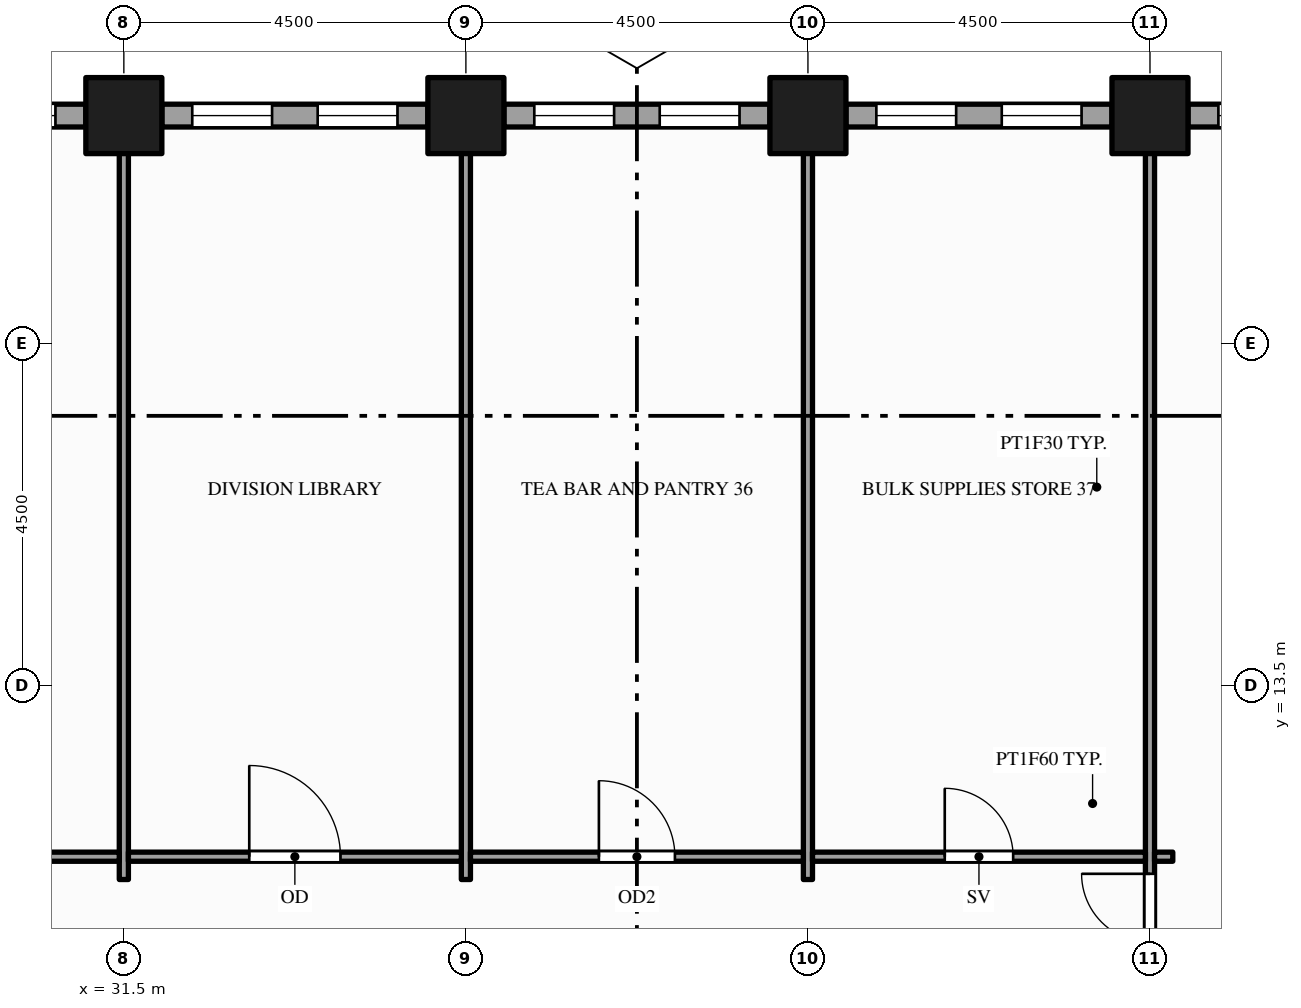
"""IFC4 building model, lengths in metres.
Left out: names, types, materials, properties, quantities, classifications, styles, units other than length and angle.
Written with IfcOpenShell. Run it as: python <this file> out.ifc"""

import sys

from ifc_helpers import new_model, si_unit, direction, frame, frame_2d, origin, origin_2d, place, context, subcontext, project, spatial, rectangle, hollow_rectangle, extrude, element, fill, save


model = new_model("IFC4")
c1 = context("Model", 3, precision=1e-05, world=origin(), true_north=direction((0.0, 1.0)))
c2 = subcontext(c1, "Body", "Model", "MODEL_VIEW")
j1 = project(units=[si_unit("LENGTHUNIT", "METRE"), si_unit("PLANEANGLEUNIT", "RADIAN")], contexts=[c1])
p1 = place(None, origin())
s1 = spatial("IfcSite", under=j1, at=p1, CompositionType="ELEMENT")
p2 = place(p1, origin())
s2 = spatial("IfcBuilding", under=s1, at=p2, CompositionType="ELEMENT")
p3 = place(p2, frame((0.0, 0.0, 115.0)))
s3 = spatial("IfcBuildingStorey", under=s2, at=p3, CompositionType="ELEMENT", Elevation=115.0)
for number, where, z_axis, x_axis in (
    (1, (31.5, 21.0, -0.15), (0.0, 0.0, 1.0), (1.0, 0.0, 0.0)),
    (2, (36.0, 21.0, -0.15), (0.0, 0.0, 1.0), (1.0, 0.0, 0.0)),
    (3, (40.5, 21.0, -0.15), (0.0, 0.0, 1.0), (1.0, 0.0, 0.0)),
    (4, (45.0, 21.0, -0.15), (0.0, 0.0, 1.0), (1.0, 0.0, 0.0)),
):
    element("IfcColumn", number, at=place(p3, frame(where, z_axis=z_axis, x_axis=x_axis)), inside=s3, PredefinedType="COLUMN", context=c2, shape_type="SweptSolid", body=[
        extrude(hollow_rectangle(XDim=1.0, YDim=1.0, WallThickness=0.05, at=origin_2d()), origin(), (0.0, 0.0, 1.0), 4.0),
    ])
p4 = place(p3, frame((49.0, 21.0, 0.0), z_axis=(0.0, 0.0, 1.0), x_axis=(-1.0, 0.0, 0.0)))
e5 = element("IfcWall", 5, at=p4, inside=s3, PredefinedType="STANDARD", context=c2, shape_type="SweptSolid", body=[
    extrude(rectangle(XDim=3.5, YDim=0.3, at=frame_2d((1.75, 0.0))), origin(), (0.0, 0.0, 1.0), 3.154),
])
p5 = place(p4, frame((0.4, 0.0, 0.9)))
e6 = element("IfcOpeningElement", 6, at=p5, cuts=e5, PredefinedType="OPENING", context=c2, shape_type="SweptSolid", body=[
    extrude(rectangle(XDim=1.05, YDim=2.0, at=frame_2d((0.525, 1.0))), frame((0.0, 0.16, 0.0), z_axis=(0.0, -1.0, 0.0), x_axis=(1.0, 0.0, 0.0)), (0.0, 0.0, 1.0), 0.32),
])
p6 = place(p4, frame((2.05, 0.0, 0.9)))
e7 = element("IfcOpeningElement", 7, at=p6, cuts=e5, PredefinedType="OPENING", context=c2, shape_type="SweptSolid", body=[
    extrude(rectangle(XDim=1.05, YDim=2.0, at=frame_2d((0.525, 1.0))), frame((0.0, 0.16, 0.0), z_axis=(0.0, -1.0, 0.0), x_axis=(1.0, 0.0, 0.0)), (0.0, 0.0, 1.0), 0.32),
])
p7 = place(p3, frame((44.5, 21.0, 0.0), z_axis=(0.0, 0.0, 1.0), x_axis=(-1.0, 0.0, 0.0)))
e8 = element("IfcWall", 8, at=p7, inside=s3, PredefinedType="STANDARD", context=c2, shape_type="SweptSolid", body=[
    extrude(rectangle(XDim=3.5, YDim=0.3, at=frame_2d((1.75, 0.0))), origin(), (0.0, 0.0, 1.0), 3.154),
])
p8 = place(p7, frame((0.4, 0.0, 0.9)))
e9 = element("IfcOpeningElement", 9, at=p8, cuts=e8, PredefinedType="OPENING", context=c2, shape_type="SweptSolid", body=[
    extrude(rectangle(XDim=1.05, YDim=2.0, at=frame_2d((0.525, 1.0))), frame((0.0, 0.16, 0.0), z_axis=(0.0, -1.0, 0.0), x_axis=(1.0, 0.0, 0.0)), (0.0, 0.0, 1.0), 0.32),
])
p9 = place(p7, frame((2.05, 0.0, 0.9)))
e10 = element("IfcOpeningElement", 10, at=p9, cuts=e8, PredefinedType="OPENING", context=c2, shape_type="SweptSolid", body=[
    extrude(rectangle(XDim=1.05, YDim=2.0, at=frame_2d((0.525, 1.0))), frame((0.0, 0.16, 0.0), z_axis=(0.0, -1.0, 0.0), x_axis=(1.0, 0.0, 0.0)), (0.0, 0.0, 1.0), 0.32),
])
p10 = place(p3, frame((40.0, 21.0, 0.0), z_axis=(0.0, 0.0, 1.0), x_axis=(-1.0, 0.0, 0.0)))
e11 = element("IfcWall", 11, at=p10, inside=s3, PredefinedType="STANDARD", context=c2, shape_type="SweptSolid", body=[
    extrude(rectangle(XDim=3.5, YDim=0.3, at=frame_2d((1.75, 0.0))), origin(), (0.0, 0.0, 1.0), 3.154),
])
p11 = place(p10, frame((0.4, 0.0, 0.9)))
e12 = element("IfcOpeningElement", 12, at=p11, cuts=e11, PredefinedType="OPENING", context=c2, shape_type="SweptSolid", body=[
    extrude(rectangle(XDim=1.05, YDim=2.0, at=frame_2d((0.525, 1.0))), frame((0.0, 0.16, 0.0), z_axis=(0.0, -1.0, 0.0), x_axis=(1.0, 0.0, 0.0)), (0.0, 0.0, 1.0), 0.32),
])
p12 = place(p10, frame((2.05, 0.0, 0.9)))
e13 = element("IfcOpeningElement", 13, at=p12, cuts=e11, PredefinedType="OPENING", context=c2, shape_type="SweptSolid", body=[
    extrude(rectangle(XDim=1.05, YDim=2.0, at=frame_2d((0.525, 1.0))), frame((0.0, 0.16, 0.0), z_axis=(0.0, -1.0, 0.0), x_axis=(1.0, 0.0, 0.0)), (0.0, 0.0, 1.0), 0.32),
])
p13 = place(p3, frame((35.5, 21.0, 0.0), z_axis=(0.0, 0.0, 1.0), x_axis=(-1.0, 0.0, 0.0)))
e14 = element("IfcWall", 14, at=p13, inside=s3, PredefinedType="STANDARD", context=c2, shape_type="SweptSolid", body=[
    extrude(rectangle(XDim=3.5, YDim=0.3, at=frame_2d((1.75, 0.0))), origin(), (0.0, 0.0, 1.0), 3.154),
])
p14 = place(p13, frame((0.4, 0.0, 0.9)))
e15 = element("IfcOpeningElement", 15, at=p14, cuts=e14, PredefinedType="OPENING", context=c2, shape_type="SweptSolid", body=[
    extrude(rectangle(XDim=1.05, YDim=2.0, at=frame_2d((0.525, 1.0))), frame((0.0, 0.16, 0.0), z_axis=(0.0, -1.0, 0.0), x_axis=(1.0, 0.0, 0.0)), (0.0, 0.0, 1.0), 0.32),
])
p15 = place(p13, frame((2.05, 0.0, 0.9)))
e16 = element("IfcOpeningElement", 16, at=p15, cuts=e14, PredefinedType="OPENING", context=c2, shape_type="SweptSolid", body=[
    extrude(rectangle(XDim=1.05, YDim=2.0, at=frame_2d((0.525, 1.0))), frame((0.0, 0.16, 0.0), z_axis=(0.0, -1.0, 0.0), x_axis=(1.0, 0.0, 0.0)), (0.0, 0.0, 1.0), 0.32),
])
p16 = place(p3, frame((31.0, 21.0, 0.0), z_axis=(0.0, 0.0, 1.0), x_axis=(-1.0, 0.0, 0.0)))
e17 = element("IfcWall", 17, at=p16, inside=s3, PredefinedType="STANDARD", context=c2, shape_type="SweptSolid", body=[
    extrude(rectangle(XDim=2.0, YDim=0.3, at=frame_2d((1.0, 0.0))), origin(), (0.0, 0.0, 1.0), 3.154),
])
p17 = place(p16, frame((0.4, 0.0, 0.9)))
e18 = element("IfcOpeningElement", 18, at=p17, cuts=e17, PredefinedType="OPENING", context=c2, shape_type="SweptSolid", body=[
    extrude(rectangle(XDim=1.2, YDim=2.0, at=frame_2d((0.6, 1.0))), frame((0.0, 0.16, 0.0), z_axis=(0.0, -1.0, 0.0), x_axis=(1.0, 0.0, 0.0)), (0.0, 0.0, 1.0), 0.32),
])
for number, where, z_axis, x_axis in (
    (19, (31.5, 10.95, 0.0), (0.0, 0.0, 1.0), (0.0, 1.0, 0.0)),
    (20, (36.0, 10.95, 0.0), (0.0, 0.0, 1.0), (0.0, 1.0, 0.0)),
    (21, (40.5, 10.95, 0.0), (0.0, 0.0, 1.0), (0.0, 1.0, 0.0)),
):
    element("IfcWall", number, at=place(p3, frame(where, z_axis=z_axis, x_axis=x_axis)), inside=s3, PredefinedType="PARTITIONING", context=c2, shape_type="SweptSolid", body=[
        extrude(rectangle(XDim=9.9, YDim=0.12, at=frame_2d((4.95, 0.0))), origin(), (0.0, 0.0, 1.0), 2.938),
    ])
p18 = place(p3, frame((45.0, -1.35, 0.0), z_axis=(0.0, 0.0, 1.0), x_axis=(0.0, 1.0, 0.0)))
e22 = element("IfcWall", 22, at=p18, inside=s3, PredefinedType="PARTITIONING", context=c2, shape_type="SweptSolid", body=[
    extrude(rectangle(XDim=22.2, YDim=0.12, at=frame_2d((11.1, 0.0))), origin(), (0.0, 0.0, 1.0), 2.938),
])
p19 = place(p18, frame((10.575, 0.0, 0.0)))
e23 = element("IfcOpeningElement", 23, at=p19, cuts=e22, PredefinedType="OPENING", context=c2, shape_type="SweptSolid", body=[
    extrude(rectangle(XDim=1.8, YDim=2.1, at=frame_2d((0.9, 1.05))), frame((0.0, 0.07, 0.0), z_axis=(0.0, -1.0, 0.0), x_axis=(1.0, 0.0, 0.0)), (0.0, 0.0, 1.0), 0.14),
])
p20 = place(p18, frame((0.85, 0.0, 0.0)))
e24 = element("IfcOpeningElement", 24, at=p20, cuts=e22, PredefinedType="OPENING", context=c2, shape_type="SweptSolid", body=[
    extrude(rectangle(XDim=0.9, YDim=2.1, at=frame_2d((0.45, 1.05))), frame((0.0, 0.07, 0.0), z_axis=(0.0, -1.0, 0.0), x_axis=(1.0, 0.0, 0.0)), (0.0, 0.0, 1.0), 0.14),
])
p21 = place(p18, frame((4.65, 0.0, 0.0)))
e25 = element("IfcOpeningElement", 25, at=p21, cuts=e22, PredefinedType="OPENING", context=c2, shape_type="SweptSolid", body=[
    extrude(rectangle(XDim=0.9, YDim=2.1, at=frame_2d((0.45, 1.05))), frame((0.0, 0.07, 0.0), z_axis=(0.0, -1.0, 0.0), x_axis=(1.0, 0.0, 0.0)), (0.0, 0.0, 1.0), 0.14),
])
p22 = place(p18, frame((8.35, 0.0, 0.0)))
e26 = element("IfcOpeningElement", 26, at=p22, cuts=e22, PredefinedType="OPENING", context=c2, shape_type="SweptSolid", body=[
    extrude(rectangle(XDim=1.0, YDim=2.1, at=frame_2d((0.5, 1.05))), frame((0.0, 0.07, 0.0), z_axis=(0.0, -1.0, 0.0), x_axis=(1.0, 0.0, 0.0)), (0.0, 0.0, 1.0), 0.14),
])
p23 = place(p3, frame((15.81, 11.25, 0.0), z_axis=(0.0, 0.0, 1.0), x_axis=(1.0, 0.0, 0.0)))
e27 = element("IfcWall", 27, at=p23, inside=s3, PredefinedType="PARTITIONING", context=c2, shape_type="SweptSolid", body=[
    extrude(rectangle(XDim=15.63, YDim=0.12, at=frame_2d((7.815, 0.0))), origin(), (0.0, 0.0, 1.0), 2.76),
])
p24 = place(p23, frame((3.54, 0.0, 0.0)))
e28 = element("IfcOpeningElement", 28, at=p24, cuts=e27, PredefinedType="OPENING", context=c2, shape_type="SweptSolid", body=[
    extrude(rectangle(XDim=1.8, YDim=2.1, at=frame_2d((0.9, 1.05))), frame((0.0, 0.07, 0.0), z_axis=(0.0, -1.0, 0.0), x_axis=(1.0, 0.0, 0.0)), (0.0, 0.0, 1.0), 0.14),
])
p25 = place(p3, frame((31.56, 11.25, 0.0), z_axis=(0.0, 0.0, 1.0), x_axis=(1.0, 0.0, 0.0)))
e29 = element("IfcWall", 29, at=p25, inside=s3, PredefinedType="PARTITIONING", context=c2, shape_type="SweptSolid", body=[
    extrude(rectangle(XDim=4.38, YDim=0.12, at=frame_2d((2.19, 0.0))), origin(), (0.0, 0.0, 1.0), 2.938),
])
p26 = place(p25, frame((1.59, 0.0, 0.0)))
e30 = element("IfcOpeningElement", 30, at=p26, cuts=e29, PredefinedType="OPENING", context=c2, shape_type="SweptSolid", body=[
    extrude(rectangle(XDim=1.2, YDim=2.1, at=frame_2d((0.6, 1.05))), frame((0.0, 0.07, 0.0), z_axis=(0.0, -1.0, 0.0), x_axis=(1.0, 0.0, 0.0)), (0.0, 0.0, 1.0), 0.14),
])
p27 = place(p3, frame((36.06, 11.25, 0.0), z_axis=(0.0, 0.0, 1.0), x_axis=(1.0, 0.0, 0.0)))
e31 = element("IfcWall", 31, at=p27, inside=s3, PredefinedType="PARTITIONING", context=c2, shape_type="SweptSolid", body=[
    extrude(rectangle(XDim=4.38, YDim=0.12, at=frame_2d((2.19, 0.0))), origin(), (0.0, 0.0, 1.0), 2.938),
])
p28 = place(p27, frame((1.69, 0.0, 0.0)))
e32 = element("IfcOpeningElement", 32, at=p28, cuts=e31, PredefinedType="OPENING", context=c2, shape_type="SweptSolid", body=[
    extrude(rectangle(XDim=1.0, YDim=2.1, at=frame_2d((0.5, 1.05))), frame((0.0, 0.07, 0.0), z_axis=(0.0, -1.0, 0.0), x_axis=(1.0, 0.0, 0.0)), (0.0, 0.0, 1.0), 0.14),
])
p29 = place(p3, frame((40.56, 11.25, 0.0), z_axis=(0.0, 0.0, 1.0), x_axis=(1.0, 0.0, 0.0)))
e33 = element("IfcWall", 33, at=p29, inside=s3, PredefinedType="PARTITIONING", context=c2, shape_type="SweptSolid", body=[
    extrude(rectangle(XDim=4.38, YDim=0.12, at=frame_2d((2.19, 0.0))), origin(), (0.0, 0.0, 1.0), 2.938),
])
p30 = place(p29, frame((1.74, 0.0, 0.0)))
e34 = element("IfcOpeningElement", 34, at=p30, cuts=e33, PredefinedType="OPENING", context=c2, shape_type="SweptSolid", body=[
    extrude(rectangle(XDim=0.9, YDim=2.1, at=frame_2d((0.45, 1.05))), frame((0.0, 0.07, 0.0), z_axis=(0.0, -1.0, 0.0), x_axis=(1.0, 0.0, 0.0)), (0.0, 0.0, 1.0), 0.14),
])
p31 = place(p3, frame((45.06, 11.25, 0.0), z_axis=(0.0, 0.0, 1.0), x_axis=(1.0, 0.0, 0.0)))
e35 = element("IfcWall", 35, at=p31, inside=s3, PredefinedType="PARTITIONING", context=c2, shape_type="SweptSolid", body=[
    extrude(rectangle(XDim=0.24, YDim=0.12, at=frame_2d((0.12, 0.0))), origin(), (0.0, 0.0, 1.0), 2.938),
])
p32 = place(p6, origin())
e36 = element("IfcWindow", 36, at=p32, inside=s3, PartitioningType="SINGLE_PANEL", PredefinedType="WINDOW", context=c2, shape_type="SweptSolid", body=[
    extrude(rectangle(XDim=1.05, YDim=2.0, at=frame_2d((0.525, 1.0))), frame((0.0, 0.03, 0.0), z_axis=(0.0, -1.0, 0.0), x_axis=(1.0, 0.0, 0.0)), (0.0, 0.0, 1.0), 0.06),
])
fill(e7, e36)
p33 = place(p8, origin())
e37 = element("IfcWindow", 37, at=p33, inside=s3, PartitioningType="SINGLE_PANEL", PredefinedType="WINDOW", context=c2, shape_type="SweptSolid", body=[
    extrude(rectangle(XDim=1.05, YDim=2.0, at=frame_2d((0.525, 1.0))), frame((0.0, 0.03, 0.0), z_axis=(0.0, -1.0, 0.0), x_axis=(1.0, 0.0, 0.0)), (0.0, 0.0, 1.0), 0.06),
])
fill(e9, e37)
p34 = place(p9, origin())
e38 = element("IfcWindow", 38, at=p34, inside=s3, PartitioningType="SINGLE_PANEL", PredefinedType="WINDOW", context=c2, shape_type="SweptSolid", body=[
    extrude(rectangle(XDim=1.05, YDim=2.0, at=frame_2d((0.525, 1.0))), frame((0.0, 0.03, 0.0), z_axis=(0.0, -1.0, 0.0), x_axis=(1.0, 0.0, 0.0)), (0.0, 0.0, 1.0), 0.06),
])
fill(e10, e38)
p35 = place(p11, origin())
e39 = element("IfcWindow", 39, at=p35, inside=s3, PartitioningType="SINGLE_PANEL", PredefinedType="WINDOW", context=c2, shape_type="SweptSolid", body=[
    extrude(rectangle(XDim=1.05, YDim=2.0, at=frame_2d((0.525, 1.0))), frame((0.0, 0.03, 0.0), z_axis=(0.0, -1.0, 0.0), x_axis=(1.0, 0.0, 0.0)), (0.0, 0.0, 1.0), 0.06),
])
fill(e12, e39)
p36 = place(p12, origin())
e40 = element("IfcWindow", 40, at=p36, inside=s3, PartitioningType="SINGLE_PANEL", PredefinedType="WINDOW", context=c2, shape_type="SweptSolid", body=[
    extrude(rectangle(XDim=1.05, YDim=2.0, at=frame_2d((0.525, 1.0))), frame((0.0, 0.03, 0.0), z_axis=(0.0, -1.0, 0.0), x_axis=(1.0, 0.0, 0.0)), (0.0, 0.0, 1.0), 0.06),
])
fill(e13, e40)
p37 = place(p14, origin())
e41 = element("IfcWindow", 41, at=p37, inside=s3, PartitioningType="SINGLE_PANEL", PredefinedType="WINDOW", context=c2, shape_type="SweptSolid", body=[
    extrude(rectangle(XDim=1.05, YDim=2.0, at=frame_2d((0.525, 1.0))), frame((0.0, 0.03, 0.0), z_axis=(0.0, -1.0, 0.0), x_axis=(1.0, 0.0, 0.0)), (0.0, 0.0, 1.0), 0.06),
])
fill(e15, e41)
p38 = place(p15, origin())
e42 = element("IfcWindow", 42, at=p38, inside=s3, PartitioningType="SINGLE_PANEL", PredefinedType="WINDOW", context=c2, shape_type="SweptSolid", body=[
    extrude(rectangle(XDim=1.05, YDim=2.0, at=frame_2d((0.525, 1.0))), frame((0.0, 0.03, 0.0), z_axis=(0.0, -1.0, 0.0), x_axis=(1.0, 0.0, 0.0)), (0.0, 0.0, 1.0), 0.06),
])
fill(e16, e42)
p39 = place(p17, origin())
e43 = element("IfcWindow", 43, at=p39, inside=s3, PartitioningType="SINGLE_PANEL", PredefinedType="WINDOW", context=c2, shape_type="SweptSolid", body=[
    extrude(rectangle(XDim=1.2, YDim=2.0, at=frame_2d((0.6, 1.0))), frame((0.0, 0.03, 0.0), z_axis=(0.0, -1.0, 0.0), x_axis=(1.0, 0.0, 0.0)), (0.0, 0.0, 1.0), 0.06),
])
fill(e18, e43)
p40 = place(p19, origin())
e44 = element("IfcDoor", 44, at=p40, inside=s3, OperationType="DOUBLE_DOOR_SINGLE_SWING", PredefinedType="DOOR", context=c2, shape_type="SweptSolid", body=[
    extrude(rectangle(XDim=1.8, YDim=2.1, at=frame_2d((0.9, 1.05))), frame((0.0, 0.025, 0.0), z_axis=(0.0, -1.0, 0.0), x_axis=(1.0, 0.0, 0.0)), (0.0, 0.0, 1.0), 0.05),
])
fill(e23, e44)
p41 = place(p26, origin())
e45 = element("IfcDoor", 45, at=p41, inside=s3, OperationType="SINGLE_SWING_LEFT", PredefinedType="DOOR", context=c2, shape_type="SweptSolid", body=[
    extrude(rectangle(XDim=1.2, YDim=2.1, at=frame_2d((0.6, 1.05))), frame((0.0, 0.025, 0.0), z_axis=(0.0, -1.0, 0.0), x_axis=(1.0, 0.0, 0.0)), (0.0, 0.0, 1.0), 0.05),
])
fill(e30, e45)
p42 = place(p28, origin())
e46 = element("IfcDoor", 46, at=p42, inside=s3, OperationType="SINGLE_SWING_LEFT", PredefinedType="DOOR", context=c2, shape_type="SweptSolid", body=[
    extrude(rectangle(XDim=1.0, YDim=2.1, at=frame_2d((0.5, 1.05))), frame((0.0, 0.025, 0.0), z_axis=(0.0, -1.0, 0.0), x_axis=(1.0, 0.0, 0.0)), (0.0, 0.0, 1.0), 0.05),
])
fill(e32, e46)
p43 = place(p30, origin())
e47 = element("IfcDoor", 47, at=p43, inside=s3, OperationType="SINGLE_SWING_LEFT", PredefinedType="DOOR", context=c2, shape_type="SweptSolid", body=[
    extrude(rectangle(XDim=0.9, YDim=2.1, at=frame_2d((0.45, 1.05))), frame((0.0, 0.025, 0.0), z_axis=(0.0, -1.0, 0.0), x_axis=(1.0, 0.0, 0.0)), (0.0, 0.0, 1.0), 0.05),
])
fill(e34, e47)
save(model, sys.argv[1])
